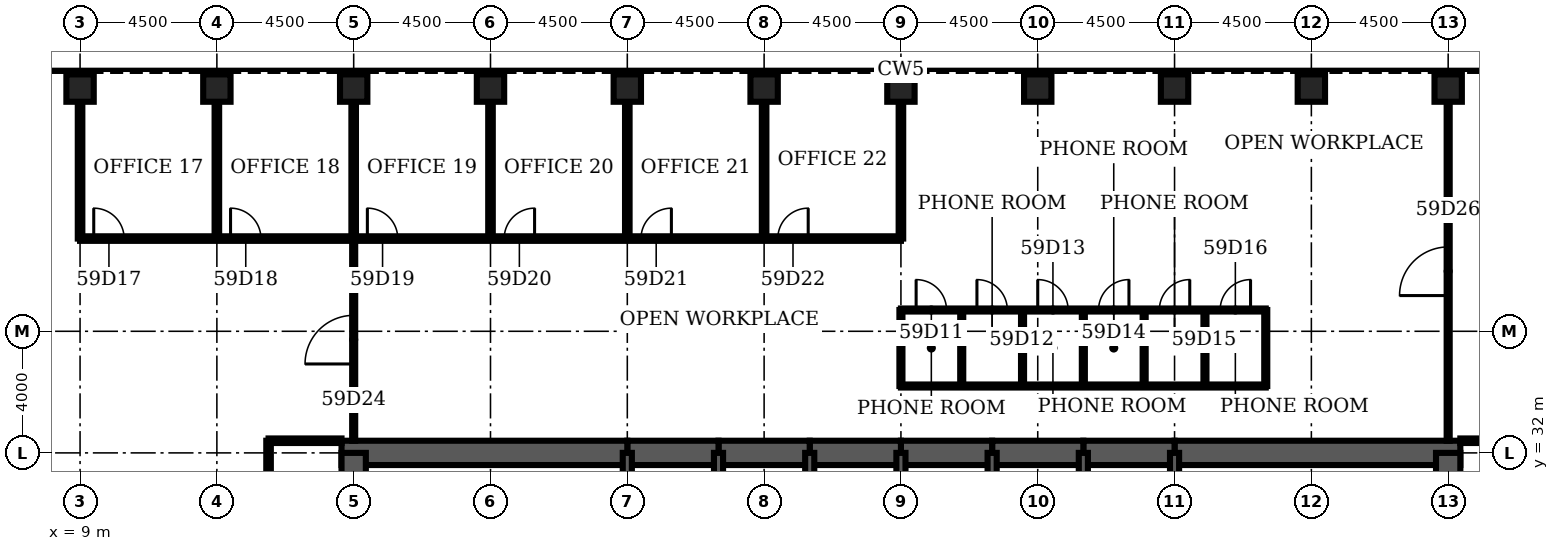
"""IFC4 building model, lengths in metres.
Left out: names, types, materials, properties, quantities, classifications, styles, units other than length and angle.
Written with IfcOpenShell. Run it as: python <this file> out.ifc"""

import sys

from ifc_helpers import new_model, si_unit, direction, frame, frame_2d, origin, origin_2d, place, context, subcontext, project, spatial, rectangle, hollow_rectangle, extrude, element, fill, save


model = new_model("IFC4")
c1 = context("Model", 3, precision=1e-05, world=origin(), true_north=direction((0.0, 1.0)))
c2 = subcontext(c1, "Body", "Model", "MODEL_VIEW")
j1 = project(units=[si_unit("LENGTHUNIT", "METRE"), si_unit("PLANEANGLEUNIT", "RADIAN")], contexts=[c1])
p1 = place(None, origin())
s1 = spatial("IfcSite", under=j1, at=p1, CompositionType="ELEMENT")
p2 = place(p1, origin())
s2 = spatial("IfcBuilding", under=s1, at=p2, CompositionType="ELEMENT")
p3 = place(p2, frame((0.0, 0.0, 261.4)))
s3 = spatial("IfcBuildingStorey", under=s2, at=p3, CompositionType="ELEMENT", Elevation=261.4)
for number, where, z_axis, x_axis in (
    (1, (54.0, 44.0, 0.0), (0.0, 0.0, 1.0), (0.0, 1.0, 0.0)),
    (2, (49.5, 44.0, 0.0), (0.0, 0.0, 1.0), (0.0, 1.0, 0.0)),
    (3, (45.0, 44.0, 0.0), (0.0, 0.0, 1.0), (0.0, 1.0, 0.0)),
    (4, (40.5, 44.0, 0.0), (0.0, 0.0, 1.0), (0.0, 1.0, 0.0)),
    (5, (36.0, 44.0, 0.0), (0.0, 0.0, 1.0), (0.0, 1.0, 0.0)),
    (6, (31.5, 44.0, 0.0), (0.0, 0.0, 1.0), (0.0, 1.0, 0.0)),
    (7, (27.0, 44.0, 0.0), (0.0, 0.0, 1.0), (0.0, 1.0, 0.0)),
    (8, (22.5, 44.0, 0.0), (0.0, 0.0, 1.0), (0.0, 1.0, 0.0)),
    (9, (18.0, 44.0, 0.0), (0.0, 0.0, 1.0), (0.0, 1.0, 0.0)),
    (10, (13.5, 44.0, 0.0), (0.0, 0.0, 1.0), (0.0, 1.0, 0.0)),
    (11, (9.0, 44.0, 0.0), (0.0, 0.0, 1.0), (0.0, 1.0, 0.0)),
):
    element("IfcColumn", number, at=place(p3, frame(where, z_axis=z_axis, x_axis=x_axis)), inside=s3, PredefinedType="COLUMN", context=c2, shape_type="SweptSolid", body=[
        extrude(hollow_rectangle(XDim=0.9, YDim=0.9, WallThickness=0.07, at=origin_2d()), origin(), (0.0, 0.0, 1.0), 4.2),
    ])
p4 = place(p3, frame((54.4, 32.0, 0.0), z_axis=(0.0, 0.0, 1.0), x_axis=(-1.0, 0.0, 0.0)))
e12 = element("IfcWall", 12, at=p4, inside=s3, PredefinedType="SHEAR", context=c2, shape_type="SweptSolid", body=[
    extrude(rectangle(XDim=9.4, YDim=0.8, at=frame_2d((4.7, 0.0))), origin(), (0.0, 0.0, 1.0), 4.2),
])
for number, where, z_axis, x_axis in (
    (13, (45.0, 32.0, 0.0), (0.0, 0.0, 1.0), (-1.0, 0.0, 0.0)),
    (14, (42.0, 32.0, 0.0), (0.0, 0.0, 1.0), (-1.0, 0.0, 0.0)),
    (15, (39.0, 32.0, 0.0), (0.0, 0.0, 1.0), (-1.0, 0.0, 0.0)),
    (16, (36.0, 32.0, 0.0), (0.0, 0.0, 1.0), (-1.0, 0.0, 0.0)),
    (17, (33.0, 32.0, 0.0), (0.0, 0.0, 1.0), (-1.0, 0.0, 0.0)),
    (18, (30.0, 32.0, 0.0), (0.0, 0.0, 1.0), (-1.0, 0.0, 0.0)),
):
    element("IfcWall", number, at=place(p3, frame(where, z_axis=z_axis, x_axis=x_axis)), inside=s3, PredefinedType="SHEAR", context=c2, shape_type="SweptSolid", body=[
        extrude(rectangle(XDim=3.0, YDim=0.8, at=frame_2d((1.5, 0.0))), origin(), (0.0, 0.0, 1.0), 4.2),
    ])
p5 = place(p3, frame((27.0, 32.0, 0.0), z_axis=(0.0, 0.0, 1.0), x_axis=(-1.0, 0.0, 0.0)))
e19 = element("IfcWall", 19, at=p5, inside=s3, PredefinedType="SHEAR", context=c2, shape_type="SweptSolid", body=[
    extrude(rectangle(XDim=9.4, YDim=0.8, at=frame_2d((4.7, 0.0))), origin(), (0.0, 0.0, 1.0), 4.2),
])
for number, where, z_axis, x_axis in (
    (20, (18.0, 32.0, 0.0), (0.0, 0.0, 1.0), (0.0, -1.0, 0.0)),
    (21, (54.0, 28.8, 0.0), (0.0, 0.0, 1.0), (0.0, 1.0, 0.0)),
):
    element("IfcWall", number, at=place(p3, frame(where, z_axis=z_axis, x_axis=x_axis)), inside=s3, PredefinedType="SHEAR", context=c2, shape_type="SweptSolid", body=[
        extrude(rectangle(XDim=3.2, YDim=0.8, at=frame_2d((1.6, 0.0))), origin(), (0.0, 0.0, 1.0), 4.2),
    ])
for number, where, z_axis, x_axis in (
    (22, (27.0, 28.8, 0.0), (0.0, 0.0, 1.0), (0.0, 1.0, 0.0)),
    (23, (30.0, 28.8, 0.0), (0.0, 0.0, 1.0), (0.0, 1.0, 0.0)),
    (24, (33.0, 28.8, 0.0), (0.0, 0.0, 1.0), (0.0, 1.0, 0.0)),
    (25, (36.0, 28.8, 0.0), (0.0, 0.0, 1.0), (0.0, 1.0, 0.0)),
    (26, (39.0, 28.8, 0.0), (0.0, 0.0, 1.0), (0.0, 1.0, 0.0)),
    (27, (42.0, 28.8, 0.0), (0.0, 0.0, 1.0), (0.0, 1.0, 0.0)),
    (28, (45.0, 28.8, 0.0), (0.0, 0.0, 1.0), (0.0, 1.0, 0.0)),
):
    element("IfcWall", number, at=place(p3, frame(where, z_axis=z_axis, x_axis=x_axis)), inside=s3, PredefinedType="SOLIDWALL", context=c2, shape_type="SweptSolid", body=[
        extrude(rectangle(XDim=3.2, YDim=0.3, at=frame_2d((1.6, 0.0))), origin(), (0.0, 0.0, 1.0), 4.2),
    ])
for number, where, z_axis, x_axis in (
    (29, (15.2, 32.4, 0.0), (0.0, 0.0, 1.0), (1.0, 0.0, 0.0)),
    (30, (54.4, 32.4, 0.0), (0.0, 0.0, 1.0), (1.0, 0.0, 0.0)),
):
    element("IfcWall", number, at=place(p3, frame(where, z_axis=z_axis, x_axis=x_axis)), inside=s3, PredefinedType="PARTITIONING", context=c2, shape_type="SweptSolid", body=[
        extrude(rectangle(XDim=2.4, YDim=0.15, at=frame_2d((1.2, 0.0))), origin(), (0.0, 0.0, 1.0), 3.0),
    ])
p6 = place(p3, frame((36.0, 34.2, 0.0), z_axis=(0.0, 0.0, 1.0), x_axis=(1.0, 0.0, 0.0)))
e31 = element("IfcWall", 31, at=p6, inside=s3, PredefinedType="PARTITIONING", context=c2, shape_type="SweptSolid", body=[
    extrude(rectangle(XDim=12.0, YDim=0.1, at=frame_2d((6.0, 0.0))), origin(), (0.0, 0.0, 1.0), 3.0),
])
p7 = place(p3, frame((36.0, 36.7, 0.0), z_axis=(0.0, 0.0, 1.0), x_axis=(1.0, 0.0, 0.0)))
e32 = element("IfcWall", 32, at=p7, inside=s3, PredefinedType="PARTITIONING", context=c2, shape_type="SweptSolid", body=[
    extrude(rectangle(XDim=12.0, YDim=0.1, at=frame_2d((6.0, 0.0))), origin(), (0.0, 0.0, 1.0), 3.0),
])
p8 = place(p7, frame((0.5, 0.0, 0.0)))
e33 = element("IfcOpeningElement", 33, at=p8, cuts=e32, PredefinedType="OPENING", context=c2, shape_type="SweptSolid", body=[
    extrude(rectangle(XDim=1.0, YDim=2.1, at=frame_2d((0.5, 1.05))), frame((0.0, 0.06, 0.0), z_axis=(0.0, -1.0, 0.0), x_axis=(1.0, 0.0, 0.0)), (0.0, 0.0, 1.0), 0.12),
])
p9 = place(p7, frame((2.5, 0.0, 0.0)))
e34 = element("IfcOpeningElement", 34, at=p9, cuts=e32, PredefinedType="OPENING", context=c2, shape_type="SweptSolid", body=[
    extrude(rectangle(XDim=1.0, YDim=2.1, at=frame_2d((0.5, 1.05))), frame((0.0, 0.06, 0.0), z_axis=(0.0, -1.0, 0.0), x_axis=(1.0, 0.0, 0.0)), (0.0, 0.0, 1.0), 0.12),
])
p10 = place(p7, frame((4.5, 0.0, 0.0)))
e35 = element("IfcOpeningElement", 35, at=p10, cuts=e32, PredefinedType="OPENING", context=c2, shape_type="SweptSolid", body=[
    extrude(rectangle(XDim=1.0, YDim=2.1, at=frame_2d((0.5, 1.05))), frame((0.0, 0.06, 0.0), z_axis=(0.0, -1.0, 0.0), x_axis=(1.0, 0.0, 0.0)), (0.0, 0.0, 1.0), 0.12),
])
p11 = place(p7, frame((6.5, 0.0, 0.0)))
e36 = element("IfcOpeningElement", 36, at=p11, cuts=e32, PredefinedType="OPENING", context=c2, shape_type="SweptSolid", body=[
    extrude(rectangle(XDim=1.0, YDim=2.1, at=frame_2d((0.5, 1.05))), frame((0.0, 0.06, 0.0), z_axis=(0.0, -1.0, 0.0), x_axis=(1.0, 0.0, 0.0)), (0.0, 0.0, 1.0), 0.12),
])
p12 = place(p7, frame((8.5, 0.0, 0.0)))
e37 = element("IfcOpeningElement", 37, at=p12, cuts=e32, PredefinedType="OPENING", context=c2, shape_type="SweptSolid", body=[
    extrude(rectangle(XDim=1.0, YDim=2.1, at=frame_2d((0.5, 1.05))), frame((0.0, 0.06, 0.0), z_axis=(0.0, -1.0, 0.0), x_axis=(1.0, 0.0, 0.0)), (0.0, 0.0, 1.0), 0.12),
])
p13 = place(p7, frame((10.5, 0.0, 0.0)))
e38 = element("IfcOpeningElement", 38, at=p13, cuts=e32, PredefinedType="OPENING", context=c2, shape_type="SweptSolid", body=[
    extrude(rectangle(XDim=1.0, YDim=2.1, at=frame_2d((0.5, 1.05))), frame((0.0, 0.06, 0.0), z_axis=(0.0, -1.0, 0.0), x_axis=(1.0, 0.0, 0.0)), (0.0, 0.0, 1.0), 0.12),
])
p14 = place(p3, frame((9.0, 39.05, 0.0), z_axis=(0.0, 0.0, 1.0), x_axis=(1.0, 0.0, 0.0)))
e39 = element("IfcWall", 39, at=p14, inside=s3, PredefinedType="PARTITIONING", context=c2, shape_type="SweptSolid", body=[
    extrude(rectangle(XDim=27.0, YDim=0.15, at=frame_2d((13.5, 0.0))), origin(), (0.0, 0.0, 1.0), 3.0),
])
p15 = place(p14, frame((0.45, 0.0, 0.0)))
e40 = element("IfcOpeningElement", 40, at=p15, cuts=e39, PredefinedType="OPENING", context=c2, shape_type="SweptSolid", body=[
    extrude(rectangle(XDim=1.0, YDim=2.1, at=frame_2d((0.5, 1.05))), frame((0.0, 0.085, 0.0), z_axis=(0.0, -1.0, 0.0), x_axis=(1.0, 0.0, 0.0)), (0.0, 0.0, 1.0), 0.17),
])
p16 = place(p14, frame((4.95, 0.0, 0.0)))
e41 = element("IfcOpeningElement", 41, at=p16, cuts=e39, PredefinedType="OPENING", context=c2, shape_type="SweptSolid", body=[
    extrude(rectangle(XDim=1.0, YDim=2.1, at=frame_2d((0.5, 1.05))), frame((0.0, 0.085, 0.0), z_axis=(0.0, -1.0, 0.0), x_axis=(1.0, 0.0, 0.0)), (0.0, 0.0, 1.0), 0.17),
])
p17 = place(p14, frame((9.45, 0.0, 0.0)))
e42 = element("IfcOpeningElement", 42, at=p17, cuts=e39, PredefinedType="OPENING", context=c2, shape_type="SweptSolid", body=[
    extrude(rectangle(XDim=1.0, YDim=2.1, at=frame_2d((0.5, 1.05))), frame((0.0, 0.085, 0.0), z_axis=(0.0, -1.0, 0.0), x_axis=(1.0, 0.0, 0.0)), (0.0, 0.0, 1.0), 0.17),
])
p18 = place(p14, frame((13.95, 0.0, 0.0)))
e43 = element("IfcOpeningElement", 43, at=p18, cuts=e39, PredefinedType="OPENING", context=c2, shape_type="SweptSolid", body=[
    extrude(rectangle(XDim=1.0, YDim=2.1, at=frame_2d((0.5, 1.05))), frame((0.0, 0.085, 0.0), z_axis=(0.0, -1.0, 0.0), x_axis=(1.0, 0.0, 0.0)), (0.0, 0.0, 1.0), 0.17),
])
p19 = place(p14, frame((18.45, 0.0, 0.0)))
e44 = element("IfcOpeningElement", 44, at=p19, cuts=e39, PredefinedType="OPENING", context=c2, shape_type="SweptSolid", body=[
    extrude(rectangle(XDim=1.0, YDim=2.1, at=frame_2d((0.5, 1.05))), frame((0.0, 0.085, 0.0), z_axis=(0.0, -1.0, 0.0), x_axis=(1.0, 0.0, 0.0)), (0.0, 0.0, 1.0), 0.17),
])
p20 = place(p14, frame((22.95, 0.0, 0.0)))
e45 = element("IfcOpeningElement", 45, at=p20, cuts=e39, PredefinedType="OPENING", context=c2, shape_type="SweptSolid", body=[
    extrude(rectangle(XDim=1.0, YDim=2.1, at=frame_2d((0.5, 1.05))), frame((0.0, 0.085, 0.0), z_axis=(0.0, -1.0, 0.0), x_axis=(1.0, 0.0, 0.0)), (0.0, 0.0, 1.0), 0.17),
])
for number, where, z_axis, x_axis in (
    (46, (9.0, 39.05, 0.0), (0.0, 0.0, 1.0), (0.0, 1.0, 0.0)),
    (47, (13.5, 39.05, 0.0), (0.0, 0.0, 1.0), (0.0, 1.0, 0.0)),
):
    element("IfcWall", number, at=place(p3, frame(where, z_axis=z_axis, x_axis=x_axis)), inside=s3, PredefinedType="PARTITIONING", context=c2, shape_type="SweptSolid", body=[
        extrude(rectangle(XDim=4.5, YDim=0.15, at=frame_2d((2.25, 0.0))), origin(), (0.0, 0.0, 1.0), 3.0),
    ])
p21 = place(p3, frame((15.2, 13.8, 0.0), z_axis=(0.0, 0.0, 1.0), x_axis=(0.0, 1.0, 0.0)))
e48 = element("IfcWall", 48, at=p21, inside=s3, PredefinedType="PARTITIONING", context=c2, shape_type="SweptSolid", body=[
    extrude(rectangle(XDim=18.6, YDim=0.15, at=frame_2d((9.3, 0.0))), origin(), (0.0, 0.0, 1.0), 3.0),
])
p22 = place(p21, frame((8.7, 0.0, 0.0)))
e49 = element("IfcOpeningElement", 49, at=p22, cuts=e48, PredefinedType="OPENING", context=c2, shape_type="SweptSolid", body=[
    extrude(rectangle(XDim=1.2, YDim=2.1, at=frame_2d((0.6, 1.05))), frame((0.0, 0.085, 0.0), z_axis=(0.0, -1.0, 0.0), x_axis=(1.0, 0.0, 0.0)), (0.0, 0.0, 1.0), 0.17),
])
p23 = place(p3, frame((18.0, 32.4, 0.0), z_axis=(0.0, 0.0, 1.0), x_axis=(0.0, 1.0, 0.0)))
e50 = element("IfcWall", 50, at=p23, inside=s3, PredefinedType="PARTITIONING", context=c2, shape_type="SweptSolid", body=[
    extrude(rectangle(XDim=6.65, YDim=0.1, at=frame_2d((3.325, 0.0))), origin(), (0.0, 0.0, 1.0), 3.0),
])
p24 = place(p23, frame((2.525, 0.0, 0.0)))
e51 = element("IfcOpeningElement", 51, at=p24, cuts=e50, PredefinedType="OPENING", context=c2, shape_type="SweptSolid", body=[
    extrude(rectangle(XDim=1.6, YDim=2.1, at=frame_2d((0.8, 1.05))), frame((0.0, 0.06, 0.0), z_axis=(0.0, -1.0, 0.0), x_axis=(1.0, 0.0, 0.0)), (0.0, 0.0, 1.0), 0.12),
])
for number, where, z_axis, x_axis in (
    (52, (18.0, 39.05, 0.0), (0.0, 0.0, 1.0), (0.0, 1.0, 0.0)),
    (53, (22.5, 39.05, 0.0), (0.0, 0.0, 1.0), (0.0, 1.0, 0.0)),
    (54, (27.0, 39.05, 0.0), (0.0, 0.0, 1.0), (0.0, 1.0, 0.0)),
    (55, (31.5, 39.05, 0.0), (0.0, 0.0, 1.0), (0.0, 1.0, 0.0)),
):
    element("IfcWall", number, at=place(p3, frame(where, z_axis=z_axis, x_axis=x_axis)), inside=s3, PredefinedType="PARTITIONING", context=c2, shape_type="SweptSolid", body=[
        extrude(rectangle(XDim=4.5, YDim=0.15, at=frame_2d((2.25, 0.0))), origin(), (0.0, 0.0, 1.0), 3.0),
    ])
p25 = place(p3, frame((36.0, 34.2, 0.0), z_axis=(0.0, 0.0, 1.0), x_axis=(0.0, 1.0, 0.0)))
e56 = element("IfcWall", 56, at=p25, inside=s3, PredefinedType="PARTITIONING", context=c2, shape_type="SweptSolid", body=[
    extrude(rectangle(XDim=2.5, YDim=0.1, at=frame_2d((1.25, 0.0))), origin(), (0.0, 0.0, 1.0), 3.0),
])
p26 = place(p3, frame((36.0, 39.05, 0.0), z_axis=(0.0, 0.0, 1.0), x_axis=(0.0, 1.0, 0.0)))
e57 = element("IfcWall", 57, at=p26, inside=s3, PredefinedType="PARTITIONING", context=c2, shape_type="SweptSolid", body=[
    extrude(rectangle(XDim=4.5, YDim=0.15, at=frame_2d((2.25, 0.0))), origin(), (0.0, 0.0, 1.0), 3.0),
])
for number, where, z_axis, x_axis in (
    (58, (38.0, 34.2, 0.0), (0.0, 0.0, 1.0), (0.0, 1.0, 0.0)),
    (59, (40.0, 34.2, 0.0), (0.0, 0.0, 1.0), (0.0, 1.0, 0.0)),
    (60, (42.0, 34.2, 0.0), (0.0, 0.0, 1.0), (0.0, 1.0, 0.0)),
):
    element("IfcWall", number, at=place(p3, frame(where, z_axis=z_axis, x_axis=x_axis)), inside=s3, PredefinedType="PARTITIONING", context=c2, shape_type="SweptSolid", body=[
        extrude(rectangle(XDim=2.5, YDim=0.1, at=frame_2d((1.25, 0.0))), origin(), (0.0, 0.0, 1.0), 3.0),
    ])
for number, where, z_axis, x_axis in (
    (61, (44.0, 34.2, 0.0), (0.0, 0.0, 1.0), (0.0, 1.0, 0.0)),
    (62, (46.0, 34.2, 0.0), (0.0, 0.0, 1.0), (0.0, 1.0, 0.0)),
):
    element("IfcWall", number, at=place(p3, frame(where, z_axis=z_axis, x_axis=x_axis)), inside=s3, PredefinedType="PARTITIONING", context=c2, shape_type="SweptSolid", body=[
        extrude(rectangle(XDim=2.5, YDim=0.1, at=frame_2d((1.25, 0.0))), origin(), (0.0, 0.0, 1.0), 2.942),
    ])
p27 = place(p3, frame((48.0, 34.2, 0.0), z_axis=(0.0, 0.0, 1.0), x_axis=(0.0, 1.0, 0.0)))
e63 = element("IfcWall", 63, at=p27, inside=s3, PredefinedType="PARTITIONING", context=c2, shape_type="SweptSolid", body=[
    extrude(rectangle(XDim=2.5, YDim=0.1, at=frame_2d((1.25, 0.0))), origin(), (0.0, 0.0, 1.0), 3.0),
])
p28 = place(p3, frame((54.0, 32.4, 0.0), z_axis=(0.0, 0.0, 1.0), x_axis=(0.0, 1.0, 0.0)))
e64 = element("IfcWall", 64, at=p28, inside=s3, PredefinedType="PARTITIONING", context=c2, shape_type="SweptSolid", body=[
    extrude(rectangle(XDim=11.15, YDim=0.1, at=frame_2d((5.575, 0.0))), origin(), (0.0, 0.0, 1.0), 3.0),
])
p29 = place(p28, frame((4.775, 0.0, 0.0)))
e65 = element("IfcOpeningElement", 65, at=p29, cuts=e64, PredefinedType="OPENING", context=c2, shape_type="SweptSolid", body=[
    extrude(rectangle(XDim=1.6, YDim=2.1, at=frame_2d((0.8, 1.05))), frame((0.0, 0.06, 0.0), z_axis=(0.0, -1.0, 0.0), x_axis=(1.0, 0.0, 0.0)), (0.0, 0.0, 1.0), 0.12),
])
p30 = place(p8, origin())
e66 = element("IfcDoor", 66, at=p30, inside=s3, OperationType="SINGLE_SWING_LEFT", PredefinedType="DOOR", context=c2, shape_type="SweptSolid", body=[
    extrude(rectangle(XDim=1.0, YDim=2.1, at=frame_2d((0.5, 1.05))), frame((0.0, 0.025, 0.0), z_axis=(0.0, -1.0, 0.0), x_axis=(1.0, 0.0, 0.0)), (0.0, 0.0, 1.0), 0.05),
])
fill(e33, e66)
p31 = place(p9, origin())
e67 = element("IfcDoor", 67, at=p31, inside=s3, OperationType="SINGLE_SWING_LEFT", PredefinedType="DOOR", context=c2, shape_type="SweptSolid", body=[
    extrude(rectangle(XDim=1.0, YDim=2.1, at=frame_2d((0.5, 1.05))), frame((0.0, 0.025, 0.0), z_axis=(0.0, -1.0, 0.0), x_axis=(1.0, 0.0, 0.0)), (0.0, 0.0, 1.0), 0.05),
])
fill(e34, e67)
p32 = place(p10, origin())
e68 = element("IfcDoor", 68, at=p32, inside=s3, OperationType="SINGLE_SWING_LEFT", PredefinedType="DOOR", context=c2, shape_type="SweptSolid", body=[
    extrude(rectangle(XDim=1.0, YDim=2.1, at=frame_2d((0.5, 1.05))), frame((0.0, 0.025, 0.0), z_axis=(0.0, -1.0, 0.0), x_axis=(1.0, 0.0, 0.0)), (0.0, 0.0, 1.0), 0.05),
])
fill(e35, e68)
p33 = place(p11, origin())
e69 = element("IfcDoor", 69, at=p33, inside=s3, OperationType="SINGLE_SWING_RIGHT", PredefinedType="DOOR", context=c2, shape_type="SweptSolid", body=[
    extrude(rectangle(XDim=1.0, YDim=2.1, at=frame_2d((0.5, 1.05))), frame((0.0, 0.025, 0.0), z_axis=(0.0, -1.0, 0.0), x_axis=(1.0, 0.0, 0.0)), (0.0, 0.0, 1.0), 0.05),
])
fill(e36, e69)
p34 = place(p12, origin())
e70 = element("IfcDoor", 70, at=p34, inside=s3, OperationType="SINGLE_SWING_RIGHT", PredefinedType="DOOR", context=c2, shape_type="SweptSolid", body=[
    extrude(rectangle(XDim=1.0, YDim=2.1, at=frame_2d((0.5, 1.05))), frame((0.0, 0.025, 0.0), z_axis=(0.0, -1.0, 0.0), x_axis=(1.0, 0.0, 0.0)), (0.0, 0.0, 1.0), 0.05),
])
fill(e37, e70)
p35 = place(p13, origin())
e71 = element("IfcDoor", 71, at=p35, inside=s3, OperationType="SINGLE_SWING_RIGHT", PredefinedType="DOOR", context=c2, shape_type="SweptSolid", body=[
    extrude(rectangle(XDim=1.0, YDim=2.1, at=frame_2d((0.5, 1.05))), frame((0.0, 0.025, 0.0), z_axis=(0.0, -1.0, 0.0), x_axis=(1.0, 0.0, 0.0)), (0.0, 0.0, 1.0), 0.05),
])
fill(e38, e71)
p36 = place(p15, origin())
e72 = element("IfcDoor", 72, at=p36, inside=s3, OperationType="SINGLE_SWING_LEFT", PredefinedType="DOOR", context=c2, shape_type="SweptSolid", body=[
    extrude(rectangle(XDim=1.0, YDim=2.1, at=frame_2d((0.5, 1.05))), frame((0.0, 0.025, 0.0), z_axis=(0.0, -1.0, 0.0), x_axis=(1.0, 0.0, 0.0)), (0.0, 0.0, 1.0), 0.05),
])
fill(e40, e72)
p37 = place(p16, origin())
e73 = element("IfcDoor", 73, at=p37, inside=s3, OperationType="SINGLE_SWING_LEFT", PredefinedType="DOOR", context=c2, shape_type="SweptSolid", body=[
    extrude(rectangle(XDim=1.0, YDim=2.1, at=frame_2d((0.5, 1.05))), frame((0.0, 0.025, 0.0), z_axis=(0.0, -1.0, 0.0), x_axis=(1.0, 0.0, 0.0)), (0.0, 0.0, 1.0), 0.05),
])
fill(e41, e73)
p38 = place(p17, origin())
e74 = element("IfcDoor", 74, at=p38, inside=s3, OperationType="SINGLE_SWING_LEFT", PredefinedType="DOOR", context=c2, shape_type="SweptSolid", body=[
    extrude(rectangle(XDim=1.0, YDim=2.1, at=frame_2d((0.5, 1.05))), frame((0.0, 0.025, 0.0), z_axis=(0.0, -1.0, 0.0), x_axis=(1.0, 0.0, 0.0)), (0.0, 0.0, 1.0), 0.05),
])
fill(e42, e74)
p39 = place(p18, origin())
e75 = element("IfcDoor", 75, at=p39, inside=s3, OperationType="SINGLE_SWING_RIGHT", PredefinedType="DOOR", context=c2, shape_type="SweptSolid", body=[
    extrude(rectangle(XDim=1.0, YDim=2.1, at=frame_2d((0.5, 1.05))), frame((0.0, 0.025, 0.0), z_axis=(0.0, -1.0, 0.0), x_axis=(1.0, 0.0, 0.0)), (0.0, 0.0, 1.0), 0.05),
])
fill(e43, e75)
p40 = place(p19, origin())
e76 = element("IfcDoor", 76, at=p40, inside=s3, OperationType="SINGLE_SWING_RIGHT", PredefinedType="DOOR", context=c2, shape_type="SweptSolid", body=[
    extrude(rectangle(XDim=1.0, YDim=2.1, at=frame_2d((0.5, 1.05))), frame((0.0, 0.025, 0.0), z_axis=(0.0, -1.0, 0.0), x_axis=(1.0, 0.0, 0.0)), (0.0, 0.0, 1.0), 0.05),
])
fill(e44, e76)
p41 = place(p20, origin())
e77 = element("IfcDoor", 77, at=p41, inside=s3, OperationType="SINGLE_SWING_RIGHT", PredefinedType="DOOR", context=c2, shape_type="SweptSolid", body=[
    extrude(rectangle(XDim=1.0, YDim=2.1, at=frame_2d((0.5, 1.05))), frame((0.0, 0.025, 0.0), z_axis=(0.0, -1.0, 0.0), x_axis=(1.0, 0.0, 0.0)), (0.0, 0.0, 1.0), 0.05),
])
fill(e45, e77)
p42 = place(p24, origin())
e78 = element("IfcDoor", 78, at=p42, inside=s3, OperationType="SINGLE_SWING_LEFT", PredefinedType="DOOR", context=c2, shape_type="SweptSolid", body=[
    extrude(rectangle(XDim=1.6, YDim=2.1, at=frame_2d((0.8, 1.05))), frame((0.0, 0.025, 0.0), z_axis=(0.0, -1.0, 0.0), x_axis=(1.0, 0.0, 0.0)), (0.0, 0.0, 1.0), 0.05),
])
fill(e51, e78)
p43 = place(p29, origin())
e79 = element("IfcDoor", 79, at=p43, inside=s3, OperationType="SINGLE_SWING_LEFT", PredefinedType="DOOR", context=c2, shape_type="SweptSolid", body=[
    extrude(rectangle(XDim=1.6, YDim=2.1, at=frame_2d((0.8, 1.05))), frame((0.0, 0.025, 0.0), z_axis=(0.0, -1.0, 0.0), x_axis=(1.0, 0.0, 0.0)), (0.0, 0.0, 1.0), 0.05),
])
fill(e65, e79)
save(model, sys.argv[1])
